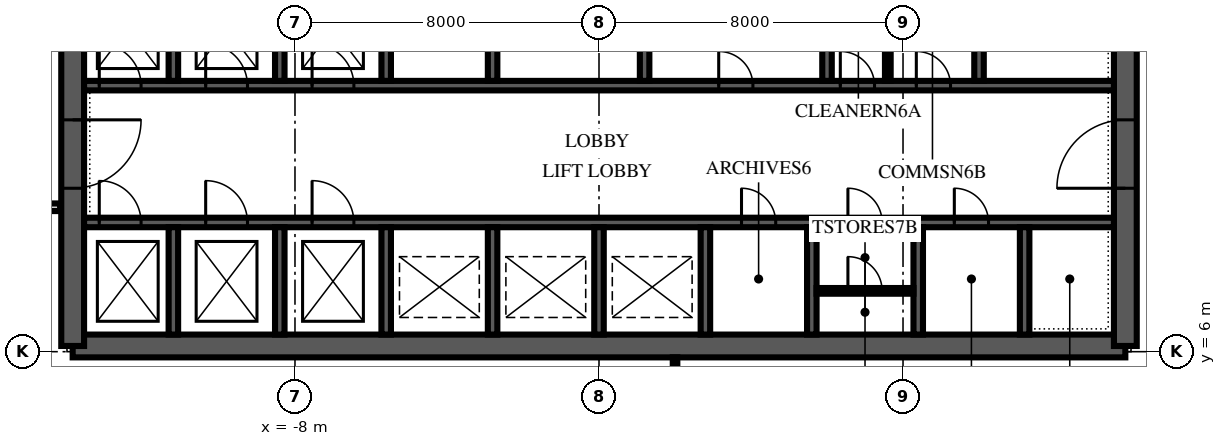
"""IFC4 building model, lengths in metres.
Left out: names, types, materials, properties, quantities, classifications, styles, units other than length and angle.
Written with IfcOpenShell. Run it as: python <this file> out.ifc"""

import sys

from ifc_helpers import new_model, si_unit, direction, frame, frame_2d, origin, place, context, subcontext, project, spatial, polyline, rectangle, outline, extrude, element, fill, save


model = new_model("IFC4")
c1 = context("Model", 3, precision=1e-05, world=origin(), true_north=direction((0.0, 1.0)))
c2 = subcontext(c1, "Body", "Model", "MODEL_VIEW")
j1 = project(units=[si_unit("LENGTHUNIT", "METRE"), si_unit("PLANEANGLEUNIT", "RADIAN")], contexts=[c1])
p1 = place(None, origin())
s1 = spatial("IfcSite", under=j1, at=p1, CompositionType="ELEMENT")
p2 = place(p1, origin())
s2 = spatial("IfcBuilding", under=s1, at=p2, CompositionType="ELEMENT")
p3 = place(p2, frame((0.0, 0.0, 202.0)))
s3 = spatial("IfcBuildingStorey", under=s2, at=p3, CompositionType="ELEMENT", Elevation=202.0)
p4 = place(p3, frame((-13.85, 6.15, 0.0), z_axis=(0.0, 0.0, 1.0), x_axis=(1.0, 0.0, 0.0)))
e1 = element("IfcWall", 1, at=p4, inside=s3, PredefinedType="SHEAR", context=c2, shape_type="SweptSolid", body=[
    extrude(rectangle(XDim=27.7, YDim=0.6, at=frame_2d((13.85, 0.0))), origin(), (0.0, 0.0, 1.0), 4.0),
])
p5 = place(p3, frame((13.85, 6.15, 0.0), z_axis=(0.0, 0.0, 1.0), x_axis=(0.0, 1.0, 0.0)))
e2 = element("IfcWall", 2, at=p5, inside=s3, PredefinedType="SHEAR", context=c2, shape_type="SweptSolid", body=[
    extrude(outline(polyline([(0.0, -0.3), (17.7, -0.3), (17.7, 0.0), (17.4, 0.0), (17.4, 0.3), (0.3, 0.3), (0.3, 0.0), (0.0, 0.0), (0.0, -0.3)])), origin(), (0.0, 0.0, 1.0), 4.0),
])
p6 = place(p5, frame((4.15, 0.0, 0.0)))
e3 = element("IfcOpeningElement", 3, at=p6, cuts=e2, PredefinedType="OPENING", context=c2, shape_type="SweptSolid", body=[
    extrude(rectangle(XDim=1.8, YDim=2.4, at=frame_2d((0.9, 1.2))), frame((0.0, 0.315, 0.0), z_axis=(0.0, -1.0, 0.0), x_axis=(1.0, 0.0, 0.0)), (0.0, 0.0, 1.0), 0.63),
])
p7 = place(p3, frame((-13.85, 23.85, 0.0), z_axis=(0.0, 0.0, 1.0), x_axis=(0.0, -1.0, 0.0)))
e4 = element("IfcWall", 4, at=p7, inside=s3, PredefinedType="SHEAR", context=c2, shape_type="SweptSolid", body=[
    extrude(outline(polyline([(0.0, -0.3), (17.7, -0.3), (17.7, 0.0), (17.4, 0.0), (17.4, 0.3), (0.3, 0.3), (0.3, 0.0), (0.0, 0.0), (0.0, -0.3)])), origin(), (0.0, 0.0, 1.0), 4.0),
])
p8 = place(p7, frame((11.75, 0.0, 0.0)))
e5 = element("IfcOpeningElement", 5, at=p8, cuts=e4, PredefinedType="OPENING", context=c2, shape_type="SweptSolid", body=[
    extrude(rectangle(XDim=1.8, YDim=2.4, at=frame_2d((0.9, 1.2))), frame((0.0, 0.315, 0.0), z_axis=(0.0, -1.0, 0.0), x_axis=(1.0, 0.0, 0.0)), (0.0, 0.0, 1.0), 0.63),
])
p9 = place(p3, frame((-13.55, 9.4, 0.0), z_axis=(0.0, 0.0, 1.0), x_axis=(1.0, 0.0, 0.0)))
e6 = element("IfcWall", 6, at=p9, inside=s3, PredefinedType="SHEAR", context=c2, shape_type="SweptSolid", body=[
    extrude(rectangle(XDim=27.1, YDim=0.25, at=frame_2d((13.55, 0.0))), origin(), (0.0, 0.0, 1.0), 4.0),
])
p10 = place(p9, frame((0.4, 0.0, 0.0)))
e7 = element("IfcOpeningElement", 7, at=p10, cuts=e6, PredefinedType="OPENING", context=c2, shape_type="SweptSolid", body=[
    extrude(rectangle(XDim=1.1, YDim=2.1, at=frame_2d((0.55, 1.05))), frame((0.0, 0.14, 0.0), z_axis=(0.0, -1.0, 0.0), x_axis=(1.0, 0.0, 0.0)), (0.0, 0.0, 1.0), 0.28),
])
p11 = place(p9, frame((3.2, 0.0, 0.0)))
e8 = element("IfcOpeningElement", 8, at=p11, cuts=e6, PredefinedType="OPENING", context=c2, shape_type="SweptSolid", body=[
    extrude(rectangle(XDim=1.1, YDim=2.1, at=frame_2d((0.55, 1.05))), frame((0.0, 0.14, 0.0), z_axis=(0.0, -1.0, 0.0), x_axis=(1.0, 0.0, 0.0)), (0.0, 0.0, 1.0), 0.28),
])
p12 = place(p9, frame((6.0, 0.0, 0.0)))
e9 = element("IfcOpeningElement", 9, at=p12, cuts=e6, PredefinedType="OPENING", context=c2, shape_type="SweptSolid", body=[
    extrude(rectangle(XDim=1.1, YDim=2.1, at=frame_2d((0.55, 1.05))), frame((0.0, 0.14, 0.0), z_axis=(0.0, -1.0, 0.0), x_axis=(1.0, 0.0, 0.0)), (0.0, 0.0, 1.0), 0.28),
])
p13 = place(p9, frame((17.3, 0.0, 0.0)))
e10 = element("IfcOpeningElement", 10, at=p13, cuts=e6, PredefinedType="OPENING", context=c2, shape_type="SweptSolid", body=[
    extrude(rectangle(XDim=0.9, YDim=2.1, at=frame_2d((0.45, 1.05))), frame((0.0, 0.14, 0.0), z_axis=(0.0, -1.0, 0.0), x_axis=(1.0, 0.0, 0.0)), (0.0, 0.0, 1.0), 0.28),
])
p14 = place(p9, frame((20.1, 0.0, 0.0)))
e11 = element("IfcOpeningElement", 11, at=p14, cuts=e6, PredefinedType="OPENING", context=c2, shape_type="SweptSolid", body=[
    extrude(rectangle(XDim=0.9, YDim=2.1, at=frame_2d((0.45, 1.05))), frame((0.0, 0.14, 0.0), z_axis=(0.0, -1.0, 0.0), x_axis=(1.0, 0.0, 0.0)), (0.0, 0.0, 1.0), 0.28),
])
p15 = place(p9, frame((22.9, 0.0, 0.0)))
e12 = element("IfcOpeningElement", 12, at=p15, cuts=e6, PredefinedType="OPENING", context=c2, shape_type="SweptSolid", body=[
    extrude(rectangle(XDim=0.9, YDim=2.1, at=frame_2d((0.45, 1.05))), frame((0.0, 0.14, 0.0), z_axis=(0.0, -1.0, 0.0), x_axis=(1.0, 0.0, 0.0)), (0.0, 0.0, 1.0), 0.28),
])
p16 = place(p3, frame((-13.55, 13.0, 0.0), z_axis=(0.0, 0.0, 1.0), x_axis=(1.0, 0.0, 0.0)))
e13 = element("IfcWall", 13, at=p16, inside=s3, PredefinedType="SHEAR", context=c2, shape_type="SweptSolid", body=[
    extrude(rectangle(XDim=27.1, YDim=0.25, at=frame_2d((13.55, 0.0))), origin(), (0.0, 0.0, 1.0), 4.0),
])
p17 = place(p16, frame((0.4, 0.0, 0.0)))
e14 = element("IfcOpeningElement", 14, at=p17, cuts=e13, PredefinedType="OPENING", context=c2, shape_type="SweptSolid", body=[
    extrude(rectangle(XDim=1.1, YDim=2.1, at=frame_2d((0.55, 1.05))), frame((0.0, 0.14, 0.0), z_axis=(0.0, -1.0, 0.0), x_axis=(1.0, 0.0, 0.0)), (0.0, 0.0, 1.0), 0.28),
])
p18 = place(p16, frame((3.2, 0.0, 0.0)))
e15 = element("IfcOpeningElement", 15, at=p18, cuts=e13, PredefinedType="OPENING", context=c2, shape_type="SweptSolid", body=[
    extrude(rectangle(XDim=1.1, YDim=2.1, at=frame_2d((0.55, 1.05))), frame((0.0, 0.14, 0.0), z_axis=(0.0, -1.0, 0.0), x_axis=(1.0, 0.0, 0.0)), (0.0, 0.0, 1.0), 0.28),
])
p19 = place(p16, frame((6.0, 0.0, 0.0)))
e16 = element("IfcOpeningElement", 16, at=p19, cuts=e13, PredefinedType="OPENING", context=c2, shape_type="SweptSolid", body=[
    extrude(rectangle(XDim=1.1, YDim=2.1, at=frame_2d((0.55, 1.05))), frame((0.0, 0.14, 0.0), z_axis=(0.0, -1.0, 0.0), x_axis=(1.0, 0.0, 0.0)), (0.0, 0.0, 1.0), 0.28),
])
p20 = place(p16, frame((16.7, 0.0, 0.0)))
e17 = element("IfcOpeningElement", 17, at=p20, cuts=e13, PredefinedType="OPENING", context=c2, shape_type="SweptSolid", body=[
    extrude(rectangle(XDim=0.9, YDim=2.1, at=frame_2d((0.45, 1.05))), frame((0.0, 0.14, 0.0), z_axis=(0.0, -1.0, 0.0), x_axis=(1.0, 0.0, 0.0)), (0.0, 0.0, 1.0), 0.28),
])
p21 = place(p16, frame((19.9, 0.0, 0.0)))
e18 = element("IfcOpeningElement", 18, at=p21, cuts=e13, PredefinedType="OPENING", context=c2, shape_type="SweptSolid", body=[
    extrude(rectangle(XDim=0.9, YDim=2.1, at=frame_2d((0.45, 1.05))), frame((0.0, 0.14, 0.0), z_axis=(0.0, -1.0, 0.0), x_axis=(1.0, 0.0, 0.0)), (0.0, 0.0, 1.0), 0.28),
])
p22 = place(p16, frame((21.9, 0.0, 0.0)))
e19 = element("IfcOpeningElement", 19, at=p22, cuts=e13, PredefinedType="OPENING", context=c2, shape_type="SweptSolid", body=[
    extrude(rectangle(XDim=0.9, YDim=2.1, at=frame_2d((0.45, 1.05))), frame((0.0, 0.14, 0.0), z_axis=(0.0, -1.0, 0.0), x_axis=(1.0, 0.0, 0.0)), (0.0, 0.0, 1.0), 0.28),
])
for number, where, z_axis, x_axis in (
    (20, (-11.2, 6.45, 0.0), (0.0, 0.0, 1.0), (0.0, 1.0, 0.0)),
    (21, (-8.4, 6.45, 0.0), (0.0, 0.0, 1.0), (0.0, 1.0, 0.0)),
    (22, (-5.6, 6.45, 0.0), (0.0, 0.0, 1.0), (0.0, 1.0, 0.0)),
    (23, (-2.8, 6.45, 0.0), (0.0, 0.0, 1.0), (0.0, 1.0, 0.0)),
    (24, (0.0, 6.45, 0.0), (0.0, 0.0, 1.0), (0.0, 1.0, 0.0)),
    (25, (2.8, 6.45, 0.0), (0.0, 0.0, 1.0), (0.0, 1.0, 0.0)),
    (26, (5.6, 6.45, 0.0), (0.0, 0.0, 1.0), (0.0, 1.0, 0.0)),
    (27, (8.4, 6.45, 0.0), (0.0, 0.0, 1.0), (0.0, 1.0, 0.0)),
    (28, (11.2, 6.45, 0.0), (0.0, 0.0, 1.0), (0.0, 1.0, 0.0)),
):
    element("IfcWall", number, at=place(p3, frame(where, z_axis=z_axis, x_axis=x_axis)), inside=s3, PredefinedType="SHEAR", context=c2, shape_type="SweptSolid", body=[
        extrude(rectangle(XDim=2.825, YDim=0.25, at=frame_2d((1.413, 0.0))), origin(), (0.0, 0.0, 1.0), 4.0),
    ])
for number, where, z_axis, x_axis in (
    (29, (-11.2, 13.125, 0.0), (0.0, 0.0, 1.0), (0.0, 1.0, 0.0)),
    (30, (-8.4, 13.125, 0.0), (0.0, 0.0, 1.0), (0.0, 1.0, 0.0)),
    (31, (-5.6, 13.125, 0.0), (0.0, 0.0, 1.0), (0.0, 1.0, 0.0)),
    (32, (-2.8, 13.125, 0.0), (0.0, 0.0, 1.0), (0.0, 1.0, 0.0)),
    (33, (1.2, 13.125, 0.0), (0.0, 0.0, 1.0), (0.0, 1.0, 0.0)),
    (34, (6.0, 13.125, 0.0), (0.0, 0.0, 1.0), (0.0, 1.0, 0.0)),
    (35, (10.0, 13.125, 0.0), (0.0, 0.0, 1.0), (0.0, 1.0, 0.0)),
):
    element("IfcWall", number, at=place(p3, frame(where, z_axis=z_axis, x_axis=x_axis)), inside=s3, PredefinedType="SHEAR", context=c2, shape_type="SweptSolid", body=[
        extrude(rectangle(XDim=2.75, YDim=0.25, at=frame_2d((1.375, 0.0))), origin(), (0.0, 0.0, 1.0), 4.0),
    ])
p23 = place(p3, frame((7.6, 13.125, 0.0), z_axis=(0.0, 0.0, 1.0), x_axis=(0.0, 1.0, 0.0)))
e36 = element("IfcWall", 36, at=p23, inside=s3, PredefinedType="PARTITIONING", context=c2, shape_type="SweptSolid", body=[
    extrude(rectangle(XDim=2.75, YDim=0.15, at=frame_2d((1.375, 0.0))), origin(), (0.0, 0.0, 1.0), 3.85),
])
p24 = place(p3, frame((5.725, 7.6, 0.0), z_axis=(0.0, 0.0, 1.0), x_axis=(1.0, 0.0, 0.0)))
e37 = element("IfcWall", 37, at=p24, inside=s3, PredefinedType="PARTITIONING", context=c2, shape_type="SweptSolid", body=[
    extrude(rectangle(XDim=2.55, YDim=0.15, at=frame_2d((1.275, 0.0))), origin(), (0.0, 0.0, 1.0), 3.85),
])
p25 = place(p24, frame((0.825, 0.0, 0.0)))
e38 = element("IfcOpeningElement", 38, at=p25, cuts=e37, PredefinedType="OPENING", context=c2, shape_type="SweptSolid", body=[
    extrude(rectangle(XDim=0.9, YDim=2.1, at=frame_2d((0.45, 1.05))), frame((0.0, 0.09, 0.0), z_axis=(0.0, -1.0, 0.0), x_axis=(1.0, 0.0, 0.0)), (0.0, 0.0, 1.0), 0.18),
])
p26 = place(p3, frame((-16.2, 9.8, 0.0), z_axis=(0.0, 0.0, 1.0), x_axis=(1.0, 0.0, 0.0)))
e39 = element("IfcWall", 39, at=p26, inside=s3, PredefinedType="PARTITIONING", context=c2, shape_type="SweptSolid", body=[
    extrude(rectangle(XDim=2.02, YDim=0.2, at=frame_2d((1.01, 0.0))), origin(), (0.0, 0.0, 1.0), 3.85),
])
p27 = place(p3, frame((2.001, 0.68, 0.0), z_axis=(0.0, 0.0, 1.0), x_axis=(0.0, 1.0, 0.0)))
e40 = element("IfcWall", 40, at=p27, inside=s3, PredefinedType="PARTITIONING", context=c2, shape_type="SweptSolid", body=[
    extrude(rectangle(XDim=5.17, YDim=0.12, at=frame_2d((2.585, 0.0))), origin(), (0.0, 0.0, 1.0), 3.85),
])
p28 = place(p6, origin())
e41 = element("IfcDoor", 41, at=p28, inside=s3, OperationType="DOUBLE_DOOR_SINGLE_SWING", PredefinedType="DOOR", context=c2, shape_type="SweptSolid", body=[
    extrude(rectangle(XDim=1.8, YDim=2.4, at=frame_2d((0.9, 1.2))), frame((0.0, 0.3, 0.0), z_axis=(0.0, -1.0, 0.0), x_axis=(1.0, 0.0, 0.0)), (0.0, 0.0, 1.0), 0.6),
])
fill(e3, e41)
p29 = place(p8, origin())
e42 = element("IfcDoor", 42, at=p29, inside=s3, OperationType="DOUBLE_DOOR_SINGLE_SWING", PredefinedType="DOOR", context=c2, shape_type="SweptSolid", body=[
    extrude(rectangle(XDim=1.8, YDim=2.4, at=frame_2d((0.9, 1.2))), frame((0.0, 0.3, 0.0), z_axis=(0.0, -1.0, 0.0), x_axis=(1.0, 0.0, 0.0)), (0.0, 0.0, 1.0), 0.6),
])
fill(e5, e42)
p30 = place(p10, origin())
e43 = element("IfcDoor", 43, at=p30, inside=s3, OperationType="SLIDING_TO_LEFT", PredefinedType="DOOR", context=c2, shape_type="SweptSolid", body=[
    extrude(rectangle(XDim=1.1, YDim=2.1, at=frame_2d((0.55, 1.05))), frame((0.0, 0.125, 0.0), z_axis=(0.0, -1.0, 0.0), x_axis=(1.0, 0.0, 0.0)), (0.0, 0.0, 1.0), 0.25),
])
fill(e7, e43)
p31 = place(p11, origin())
e44 = element("IfcDoor", 44, at=p31, inside=s3, OperationType="SLIDING_TO_LEFT", PredefinedType="DOOR", context=c2, shape_type="SweptSolid", body=[
    extrude(rectangle(XDim=1.1, YDim=2.1, at=frame_2d((0.55, 1.05))), frame((0.0, 0.125, 0.0), z_axis=(0.0, -1.0, 0.0), x_axis=(1.0, 0.0, 0.0)), (0.0, 0.0, 1.0), 0.25),
])
fill(e8, e44)
p32 = place(p12, origin())
e45 = element("IfcDoor", 45, at=p32, inside=s3, OperationType="SLIDING_TO_LEFT", PredefinedType="DOOR", context=c2, shape_type="SweptSolid", body=[
    extrude(rectangle(XDim=1.1, YDim=2.1, at=frame_2d((0.55, 1.05))), frame((0.0, 0.125, 0.0), z_axis=(0.0, -1.0, 0.0), x_axis=(1.0, 0.0, 0.0)), (0.0, 0.0, 1.0), 0.25),
])
fill(e9, e45)
p33 = place(p17, origin())
e46 = element("IfcDoor", 46, at=p33, inside=s3, OperationType="SLIDING_TO_LEFT", PredefinedType="DOOR", context=c2, shape_type="SweptSolid", body=[
    extrude(rectangle(XDim=1.1, YDim=2.1, at=frame_2d((0.55, 1.05))), frame((0.0, 0.125, 0.0), z_axis=(0.0, -1.0, 0.0), x_axis=(1.0, 0.0, 0.0)), (0.0, 0.0, 1.0), 0.25),
])
fill(e14, e46)
p34 = place(p18, origin())
e47 = element("IfcDoor", 47, at=p34, inside=s3, OperationType="SLIDING_TO_LEFT", PredefinedType="DOOR", context=c2, shape_type="SweptSolid", body=[
    extrude(rectangle(XDim=1.1, YDim=2.1, at=frame_2d((0.55, 1.05))), frame((0.0, 0.125, 0.0), z_axis=(0.0, -1.0, 0.0), x_axis=(1.0, 0.0, 0.0)), (0.0, 0.0, 1.0), 0.25),
])
fill(e15, e47)
p35 = place(p19, origin())
e48 = element("IfcDoor", 48, at=p35, inside=s3, OperationType="SLIDING_TO_LEFT", PredefinedType="DOOR", context=c2, shape_type="SweptSolid", body=[
    extrude(rectangle(XDim=1.1, YDim=2.1, at=frame_2d((0.55, 1.05))), frame((0.0, 0.125, 0.0), z_axis=(0.0, -1.0, 0.0), x_axis=(1.0, 0.0, 0.0)), (0.0, 0.0, 1.0), 0.25),
])
fill(e16, e48)
p36 = place(p20, origin())
e49 = element("IfcDoor", 49, at=p36, inside=s3, OperationType="SINGLE_SWING_LEFT", PredefinedType="DOOR", context=c2, shape_type="SweptSolid", body=[
    extrude(rectangle(XDim=0.9, YDim=2.1, at=frame_2d((0.45, 1.05))), frame((0.0, 0.125, 0.0), z_axis=(0.0, -1.0, 0.0), x_axis=(1.0, 0.0, 0.0)), (0.0, 0.0, 1.0), 0.25),
])
fill(e17, e49)
p37 = place(p21, origin())
e50 = element("IfcDoor", 50, at=p37, inside=s3, OperationType="SINGLE_SWING_LEFT", PredefinedType="DOOR", context=c2, shape_type="SweptSolid", body=[
    extrude(rectangle(XDim=0.9, YDim=2.1, at=frame_2d((0.45, 1.05))), frame((0.0, 0.125, 0.0), z_axis=(0.0, -1.0, 0.0), x_axis=(1.0, 0.0, 0.0)), (0.0, 0.0, 1.0), 0.25),
])
fill(e18, e50)
p38 = place(p22, origin())
e51 = element("IfcDoor", 51, at=p38, inside=s3, OperationType="SINGLE_SWING_LEFT", PredefinedType="DOOR", context=c2, shape_type="SweptSolid", body=[
    extrude(rectangle(XDim=0.9, YDim=2.1, at=frame_2d((0.45, 1.05))), frame((0.0, 0.125, 0.0), z_axis=(0.0, -1.0, 0.0), x_axis=(1.0, 0.0, 0.0)), (0.0, 0.0, 1.0), 0.25),
])
fill(e19, e51)
p39 = place(p13, origin())
e52 = element("IfcDoor", 52, at=p39, inside=s3, OperationType="SINGLE_SWING_LEFT", PredefinedType="DOOR", context=c2, shape_type="SweptSolid", body=[
    extrude(rectangle(XDim=0.9, YDim=2.1, at=frame_2d((0.45, 1.05))), frame((0.0, 0.125, 0.0), z_axis=(0.0, -1.0, 0.0), x_axis=(1.0, 0.0, 0.0)), (0.0, 0.0, 1.0), 0.25),
])
fill(e10, e52)
p40 = place(p14, origin())
e53 = element("IfcDoor", 53, at=p40, inside=s3, OperationType="SINGLE_SWING_LEFT", PredefinedType="DOOR", context=c2, shape_type="SweptSolid", body=[
    extrude(rectangle(XDim=0.9, YDim=2.1, at=frame_2d((0.45, 1.05))), frame((0.0, 0.125, 0.0), z_axis=(0.0, -1.0, 0.0), x_axis=(1.0, 0.0, 0.0)), (0.0, 0.0, 1.0), 0.25),
])
fill(e11, e53)
p41 = place(p25, origin())
e54 = element("IfcDoor", 54, at=p41, inside=s3, OperationType="SINGLE_SWING_LEFT", PredefinedType="DOOR", context=c2, shape_type="SweptSolid", body=[
    extrude(rectangle(XDim=0.9, YDim=2.1, at=frame_2d((0.45, 1.05))), frame((0.0, 0.075, 0.0), z_axis=(0.0, -1.0, 0.0), x_axis=(1.0, 0.0, 0.0)), (0.0, 0.0, 1.0), 0.149),
])
fill(e38, e54)
p42 = place(p15, origin())
e55 = element("IfcDoor", 55, at=p42, inside=s3, OperationType="SINGLE_SWING_LEFT", PredefinedType="DOOR", context=c2, shape_type="SweptSolid", body=[
    extrude(rectangle(XDim=0.9, YDim=2.1, at=frame_2d((0.45, 1.05))), frame((0.0, 0.125, 0.0), z_axis=(0.0, -1.0, 0.0), x_axis=(1.0, 0.0, 0.0)), (0.0, 0.0, 1.0), 0.25),
])
fill(e12, e55)
save(model, sys.argv[1])
